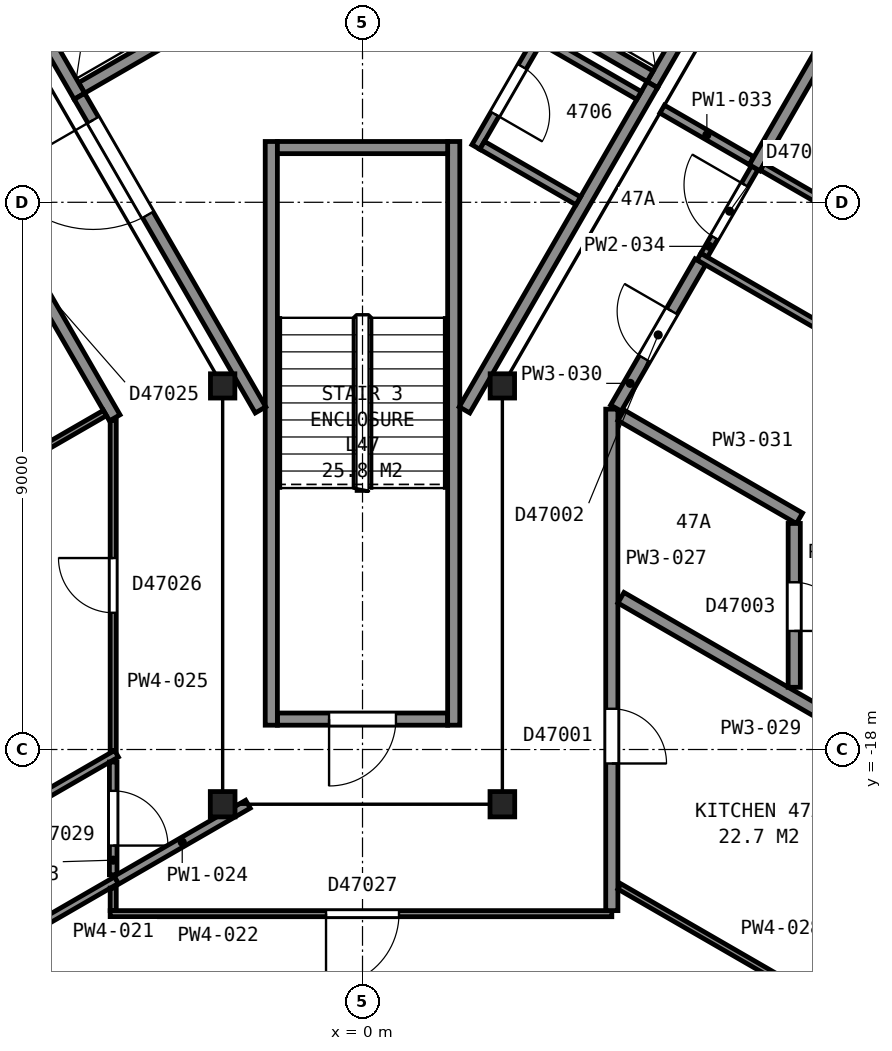
"""IFC4 building model, lengths in metres.
Left out: names, types, materials, properties, quantities, classifications, styles, units other than length and angle.
Written with IfcOpenShell. Run it as: python <this file> out.ifc"""

import sys

from ifc_helpers import new_model, si_unit, direction, frame, frame_2d, origin, origin_2d, place, context, subcontext, project, spatial, rectangle, i_section, extrude, element, fill, save


model = new_model("IFC4")
c1 = context("Model", 3, precision=1e-05, world=origin(), true_north=direction((0.0, 1.0)))
c2 = subcontext(c1, "Body", "Model", "MODEL_VIEW")
j1 = project(units=[si_unit("LENGTHUNIT", "METRE"), si_unit("PLANEANGLEUNIT", "RADIAN")], contexts=[c1])
p1 = place(None, origin())
s1 = spatial("IfcSite", under=j1, at=p1, CompositionType="ELEMENT")
p2 = place(p1, origin())
s2 = spatial("IfcBuilding", under=s1, at=p2, CompositionType="ELEMENT")
p3 = place(p2, frame((0.0, 0.0, 189.5)))
s3 = spatial("IfcBuildingStorey", under=s2, at=p3, CompositionType="ELEMENT", Elevation=189.5)
p4 = place(p3, frame((-2.3, -12.02, 0.0), z_axis=(0.0, 0.0, 1.0), x_axis=(1.0, 0.0, 0.0)))
e1 = element("IfcColumn", 1, at=p4, inside=s3, PredefinedType="COLUMN", context=c2, shape_type="SweptSolid", body=[
    extrude(i_section(OverallWidth=0.401, OverallDepth=0.399, WebThickness=0.025, FlangeThickness=0.04, FilletRadius=0.015, at=origin_2d()), origin(), (0.0, 0.0, 1.0), 3.7),
])
for number, where, z_axis, x_axis in (
    (2, (-2.3, -18.9, 0.0), (0.0, 0.0, 1.0), (-1.0, 0.0, 0.0)),
    (3, (2.3, -18.9, 0.0), (0.0, 0.0, 1.0), (-1.0, 0.0, 0.0)),
):
    element("IfcColumn", number, at=place(p3, frame(where, z_axis=z_axis, x_axis=x_axis)), inside=s3, PredefinedType="COLUMN", context=c2, shape_type="SweptSolid", body=[
        extrude(i_section(OverallWidth=0.406, OverallDepth=0.417, WebThickness=0.03, FlangeThickness=0.048, FilletRadius=0.015, at=origin_2d()), origin(), (0.0, 0.0, 1.0), 3.7),
    ])
p5 = place(p3, frame((2.3, -12.02, 0.0), z_axis=(0.0, 0.0, 1.0), x_axis=(1.0, 0.0, 0.0)))
e4 = element("IfcColumn", 4, at=p5, inside=s3, PredefinedType="COLUMN", context=c2, shape_type="SweptSolid", body=[
    extrude(i_section(OverallWidth=0.401, OverallDepth=0.399, WebThickness=0.025, FlangeThickness=0.04, FilletRadius=0.015, at=origin_2d()), origin(), (0.0, 0.0, 1.0), 3.7),
])
p6 = place(p3, frame((-1.4, -17.5, 0.0), z_axis=(0.0, 0.0, 1.0), x_axis=(1.0, 0.0, 0.0)))
e5 = element("IfcWall", 5, at=p6, inside=s3, PredefinedType="PARTITIONING", context=c2, shape_type="SweptSolid", body=[
    extrude(rectangle(XDim=2.8, YDim=0.2, at=frame_2d((1.4, 0.0))), origin(), (0.0, 0.0, 1.0), 3.45),
])
p7 = place(p6, frame((0.85, 0.0, 0.0)))
e6 = element("IfcOpeningElement", 6, at=p7, cuts=e5, PredefinedType="OPENING", context=c2, shape_type="SweptSolid", body=[
    extrude(rectangle(XDim=1.1, YDim=2.1, at=frame_2d((0.55, 1.05))), frame((0.0, 0.11, 0.0), z_axis=(0.0, -1.0, 0.0), x_axis=(1.0, 0.0, 0.0)), (0.0, 0.0, 1.0), 0.22),
])
for number, where, z_axis, x_axis in (
    (7, (1.5, -8.0, 0.0), (0.0, 0.0, 1.0), (0.0, -1.0, 0.0)),
    (8, (-1.5, -8.0, 0.0), (0.0, 0.0, 1.0), (0.0, -1.0, 0.0)),
):
    element("IfcWall", number, at=place(p3, frame(where, z_axis=z_axis, x_axis=x_axis)), inside=s3, PredefinedType="PARTITIONING", context=c2, shape_type="SweptSolid", body=[
        extrude(rectangle(XDim=9.6, YDim=0.2, at=frame_2d((4.8, 0.0))), origin(), (0.0, 0.0, 1.0), 3.45),
    ])
p8 = place(p3, frame((-1.4, -8.1, 0.0), z_axis=(0.0, 0.0, 1.0), x_axis=(1.0, 0.0, 0.0)))
e9 = element("IfcWall", 9, at=p8, inside=s3, PredefinedType="PARTITIONING", context=c2, shape_type="SweptSolid", body=[
    extrude(rectangle(XDim=2.8, YDim=0.2, at=frame_2d((1.4, 0.0))), origin(), (0.0, 0.0, 1.0), 3.45),
])
p9 = place(p3, frame((-4.62, -7.118, 0.0), z_axis=(0.0, 0.0, 1.0), x_axis=(0.866036909293, 0.499980071345, 0.0)))
e10 = element("IfcWall", 10, at=p9, inside=s3, PredefinedType="PARTITIONING", context=c2, shape_type="SweptSolid", body=[
    extrude(rectangle(XDim=1.75, YDim=0.2, at=frame_2d((0.875, 0.0))), origin(), (0.0, 0.0, 1.0), 3.7),
])
p10 = place(p3, frame((4.766, -7.065, 0.0), z_axis=(0.0, 0.0, 1.0), x_axis=(0.499948979701, 0.866054858364, 0.0)))
e11 = element("IfcWall", 11, at=p10, inside=s3, PredefinedType="PARTITIONING", context=c2, shape_type="SweptSolid", body=[
    extrude(rectangle(XDim=2.55, YDim=0.2, at=frame_2d((1.275, 0.0))), origin(), (0.0, 0.0, 1.0), 3.7),
])
p11 = place(p3, frame((-4.656, -7.255, 0.0), z_axis=(0.0, 0.0, 1.0), x_axis=(-0.499990435942, 0.866030925526, 0.0)))
e12 = element("IfcWall", 12, at=p11, inside=s3, PredefinedType="PARTITIONING", context=c2, shape_type="SweptSolid", body=[
    extrude(rectangle(XDim=2.55, YDim=0.2, at=frame_2d((1.275, 0.0))), origin(), (0.0, 0.0, 1.0), 3.7),
])
p12 = place(p3, frame((4.73, -6.928, 0.0), z_axis=(0.0, 0.0, 1.0), x_axis=(-0.866036909293, 0.499980071345, 0.0)))
e13 = element("IfcWall", 13, at=p12, inside=s3, PredefinedType="PARTITIONING", context=c2, shape_type="SweptSolid", body=[
    extrude(rectangle(XDim=1.75, YDim=0.2, at=frame_2d((0.875, 0.0))), origin(), (0.0, 0.0, 1.0), 3.7),
])
p13 = place(p3, frame((-4.655, -7.257, 0.0), z_axis=(0.0, 0.0, 1.0), x_axis=(0.499966124405, -0.866044960985, 0.0)))
e14 = element("IfcWall", 14, at=p13, inside=s3, PredefinedType="PARTITIONING", context=c2, shape_type="SweptSolid", body=[
    extrude(rectangle(XDim=5.956, YDim=0.2, at=frame_2d((2.978, 0.0))), origin(), (0.0, 0.0, 1.0), 3.45),
])
p14 = place(p13, frame((0.45, 0.0, 0.0)))
e15 = element("IfcOpeningElement", 15, at=p14, cuts=e14, PredefinedType="OPENING", context=c2, shape_type="SweptSolid", body=[
    extrude(rectangle(XDim=1.8, YDim=2.1, at=frame_2d((0.9, 1.05))), frame((0.0, 0.11, 0.0), z_axis=(0.0, -1.0, 0.0), x_axis=(1.0, 0.0, 0.0)), (0.0, 0.0, 1.0), 0.22),
])
p15 = place(p3, frame((1.677, -12.415, 0.0), z_axis=(0.0, 0.0, 1.0), x_axis=(0.500054337157, 0.865994029939, 0.0)))
e16 = element("IfcWall", 16, at=p15, inside=s3, PredefinedType="PARTITIONING", context=c2, shape_type="SweptSolid", body=[
    extrude(rectangle(XDim=6.177, YDim=0.2, at=frame_2d((3.088, 0.0))), origin(), (0.0, 0.0, 1.0), 3.45),
])
p16 = place(p3, frame((2.939, -6.229, 0.0), z_axis=(0.0, 0.0, 1.0), x_axis=(-0.499961633463, -0.866047553582, 0.0)))
e17 = element("IfcWall", 17, at=p16, inside=s3, PredefinedType="PARTITIONING", context=c2, shape_type="SweptSolid", body=[
    extrude(rectangle(XDim=2.15, YDim=0.15, at=frame_2d((1.075, 0.0))), origin(), (0.0, 0.0, 1.0), 3.45),
])
p17 = place(p16, frame((0.625, 0.0, 0.0)))
e18 = element("IfcOpeningElement", 18, at=p17, cuts=e17, PredefinedType="OPENING", context=c2, shape_type="SweptSolid", body=[
    extrude(rectangle(XDim=0.9, YDim=2.1, at=frame_2d((0.45, 1.05))), frame((0.0, 0.085, 0.0), z_axis=(0.0, -1.0, 0.0), x_axis=(1.0, 0.0, 0.0)), (0.0, 0.0, 1.0), 0.17),
])
p18 = place(p3, frame((1.967, -8.063, 0.0), z_axis=(0.0, 0.0, 1.0), x_axis=(0.865978377894, -0.500081442387, 0.0)))
e19 = element("IfcWall", 19, at=p18, inside=s3, PredefinedType="PARTITIONING", context=c2, shape_type="SweptSolid", body=[
    extrude(rectangle(XDim=1.825, YDim=0.15, at=frame_2d((0.913, 0.0))), origin(), (0.0, 0.0, 1.0), 3.45),
])
p19 = place(p3, frame((2.967, -6.332, 0.0), z_axis=(0.0, 0.0, 1.0), x_axis=(0.866036312054, -0.499981105847, 0.0)))
e20 = element("IfcWall", 20, at=p19, inside=s3, PredefinedType="PARTITIONING", context=c2, shape_type="SweptSolid", body=[
    extrude(rectangle(XDim=1.825, YDim=0.15, at=frame_2d((0.912, 0.0))), origin(), (0.0, 0.0, 1.0), 3.45),
])
p20 = place(p3, frame((-4.075, -12.545, 0.0), z_axis=(0.0, 0.0, 1.0), x_axis=(-0.499999743747, 0.866025551732, 0.0)))
e21 = element("IfcWall", 21, at=p20, inside=s3, PredefinedType="PARTITIONING", context=c2, shape_type="SweptSolid", body=[
    extrude(rectangle(XDim=17.656, YDim=0.2, at=frame_2d((8.828, 0.0))), origin(), (0.0, 0.0, 1.0), 2.713),
])
p21 = place(p20, frame((10.83, 0.0, 0.0)))
e22 = element("IfcOpeningElement", 22, at=p21, cuts=e21, PredefinedType="OPENING", context=c2, shape_type="SweptSolid", body=[
    extrude(rectangle(XDim=0.9, YDim=2.1, at=frame_2d((0.45, 1.05))), frame((0.0, 0.11, 0.0), z_axis=(0.0, -1.0, 0.0), x_axis=(1.0, 0.0, 0.0)), (0.0, 0.0, 1.0), 0.22),
])
p22 = place(p20, frame((7.148, 0.0, 0.0)))
e23 = element("IfcOpeningElement", 23, at=p22, cuts=e21, PredefinedType="OPENING", context=c2, shape_type="SweptSolid", body=[
    extrude(rectangle(XDim=0.9, YDim=2.1, at=frame_2d((0.45, 1.05))), frame((0.0, 0.11, 0.0), z_axis=(0.0, -1.0, 0.0), x_axis=(1.0, 0.0, 0.0)), (0.0, 0.0, 1.0), 0.22),
])
p23 = place(p20, frame((2.198, 0.0, 0.0)))
e24 = element("IfcOpeningElement", 24, at=p23, cuts=e21, PredefinedType="OPENING", context=c2, shape_type="SweptSolid", body=[
    extrude(rectangle(XDim=0.9, YDim=2.1, at=frame_2d((0.45, 1.05))), frame((0.0, 0.11, 0.0), z_axis=(0.0, -1.0, 0.0), x_axis=(1.0, 0.0, 0.0)), (0.0, 0.0, 1.0), 0.22),
])
p24 = place(p3, frame((-11.54, -16.682, 0.0), z_axis=(0.0, 0.0, 1.0), x_axis=(0.866063141794, 0.499934630153, 0.0)))
e25 = element("IfcWall", 25, at=p24, inside=s3, PredefinedType="PARTITIONING", context=c2, shape_type="SweptSolid", body=[
    extrude(rectangle(XDim=8.433, YDim=0.1, at=frame_2d((4.217, 0.0))), origin(), (0.0, 0.0, 1.0), 2.713),
])
p25 = place(p3, frame((-9.066, -20.968, 0.0), z_axis=(0.0, 0.0, 1.0), x_axis=(0.866023559602, 0.500003194204, 0.0)))
e26 = element("IfcWall", 26, at=p25, inside=s3, PredefinedType="PARTITIONING", context=c2, shape_type="SweptSolid", body=[
    extrude(rectangle(XDim=5.796, YDim=0.125, at=frame_2d((2.898, 0.0))), origin(), (0.0, 0.0, 1.0), 2.713),
])
p26 = place(p3, frame((-8.166, -22.527, 0.0), z_axis=(0.0, 0.0, 1.0), x_axis=(0.866042865666, 0.499969753915, 0.0)))
e27 = element("IfcWall", 27, at=p26, inside=s3, PredefinedType="PARTITIONING", context=c2, shape_type="SweptSolid", body=[
    extrude(rectangle(XDim=4.757, YDim=0.125, at=frame_2d((2.378, 0.0))), origin(), (0.0, 0.0, 1.0), 2.713),
])
p27 = place(p3, frame((-4.1, -20.65, 0.0), z_axis=(0.0, 0.0, 1.0), x_axis=(0.0, 1.0, 0.0)))
e28 = element("IfcWall", 28, at=p27, inside=s3, PredefinedType="PARTITIONING", context=c2, shape_type="SweptSolid", body=[
    extrude(rectangle(XDim=0.37, YDim=0.1, at=frame_2d((0.185, 0.0))), origin(), (0.0, 0.0, 1.0), 2.713),
])
p28 = place(p3, frame((4.1, -20.7, 0.0), z_axis=(0.0, 0.0, 1.0), x_axis=(-1.0, 0.0, 0.0)))
e29 = element("IfcWall", 29, at=p28, inside=s3, PredefinedType="PARTITIONING", context=c2, shape_type="SweptSolid", body=[
    extrude(rectangle(XDim=8.25, YDim=0.1, at=frame_2d((4.125, 0.0))), origin(), (0.0, 0.0, 1.0), 2.713),
])
p29 = place(p28, frame((3.5, 0.0, 0.0)))
e30 = element("IfcOpeningElement", 30, at=p29, cuts=e29, PredefinedType="OPENING", context=c2, shape_type="SweptSolid", body=[
    extrude(rectangle(XDim=1.2, YDim=2.1, at=frame_2d((0.6, 1.05))), frame((0.0, 0.06, 0.0), z_axis=(0.0, -1.0, 0.0), x_axis=(1.0, 0.0, 0.0)), (0.0, 0.0, 1.0), 0.12),
])
p30 = place(p3, frame((-4.1, -18.206, 0.0), z_axis=(0.0, 0.0, 1.0), x_axis=(0.0, -1.0, 0.0)))
e31 = element("IfcWall", 31, at=p30, inside=s3, PredefinedType="PARTITIONING", context=c2, shape_type="SweptSolid", body=[
    extrude(rectangle(XDim=1.854, YDim=0.125, at=frame_2d((0.927, 0.0))), origin(), (0.0, 0.0, 1.0), 2.713),
])
p31 = place(p30, frame((0.474, 0.0, 0.0)))
e32 = element("IfcOpeningElement", 32, at=p31, cuts=e31, PredefinedType="OPENING", context=c2, shape_type="SweptSolid", body=[
    extrude(rectangle(XDim=0.9, YDim=2.1, at=frame_2d((0.45, 1.05))), frame((0.0, 0.073, 0.0), z_axis=(0.0, -1.0, 0.0), x_axis=(1.0, 0.0, 0.0)), (0.0, 0.0, 1.0), 0.145),
])
p32 = place(p3, frame((-4.046, -20.149, 0.0), z_axis=(0.0, 0.0, 1.0), x_axis=(0.865916841101, 0.500187988959, 0.0)))
e33 = element("IfcWall", 33, at=p32, inside=s3, PredefinedType="PARTITIONING", context=c2, shape_type="SweptSolid", body=[
    extrude(rectangle(XDim=2.497, YDim=0.15, at=frame_2d((1.248, 0.0))), origin(), (0.0, 0.0, 1.0), 2.713),
])
p33 = place(p3, frame((-4.1, -18.016, 0.0), z_axis=(0.0, 0.0, 1.0), x_axis=(0.0, 1.0, 0.0)))
e34 = element("IfcWall", 34, at=p33, inside=s3, PredefinedType="PARTITIONING", context=c2, shape_type="SweptSolid", body=[
    extrude(rectangle(XDim=5.429, YDim=0.1, at=frame_2d((2.715, 0.0))), origin(), (0.0, 0.0, 1.0), 2.713),
])
p34 = place(p33, frame((2.265, 0.0, 0.0)))
e35 = element("IfcOpeningElement", 35, at=p34, cuts=e34, PredefinedType="OPENING", context=c2, shape_type="SweptSolid", body=[
    extrude(rectangle(XDim=0.9, YDim=2.1, at=frame_2d((0.45, 1.05))), frame((0.0, 0.06, 0.0), z_axis=(0.0, -1.0, 0.0), x_axis=(1.0, 0.0, 0.0)), (0.0, 0.0, 1.0), 0.12),
])
p35 = place(p3, frame((4.1, -12.402, 0.0), z_axis=(0.0, 0.0, 1.0), x_axis=(0.0, -1.0, 0.0)))
e36 = element("IfcWall", 36, at=p35, inside=s3, PredefinedType="PARTITIONING", context=c2, shape_type="SweptSolid", body=[
    extrude(rectangle(XDim=8.248, YDim=0.2, at=frame_2d((4.124, 0.0))), origin(), (0.0, 0.0, 1.0), 2.713),
])
p36 = place(p35, frame((4.928, 0.0, 0.0)))
e37 = element("IfcOpeningElement", 37, at=p36, cuts=e36, PredefinedType="OPENING", context=c2, shape_type="SweptSolid", body=[
    extrude(rectangle(XDim=0.9, YDim=2.1, at=frame_2d((0.45, 1.05))), frame((0.0, 0.11, 0.0), z_axis=(0.0, -1.0, 0.0), x_axis=(1.0, 0.0, 0.0)), (0.0, 0.0, 1.0), 0.22),
])
p37 = place(p3, frame((4.225, -20.252, 0.0), z_axis=(0.0, 0.0, 1.0), x_axis=(0.866048884701, -0.499959327653, 0.0)))
e38 = element("IfcWall", 38, at=p37, inside=s3, PredefinedType="PARTITIONING", context=c2, shape_type="SweptSolid", body=[
    extrude(rectangle(XDim=4.55, YDim=0.1, at=frame_2d((2.275, 0.0))), origin(), (0.0, 0.0, 1.0), 2.713),
])
p38 = place(p3, frame((4.25, -15.504, 0.0), z_axis=(0.0, 0.0, 1.0), x_axis=(0.866025383743, -0.500000034713, 0.0)))
e39 = element("IfcWall", 39, at=p38, inside=s3, PredefinedType="PARTITIONING", context=c2, shape_type="SweptSolid", body=[
    extrude(rectangle(XDim=6.903, YDim=0.2, at=frame_2d((3.451, 0.0))), origin(), (0.0, 0.0, 1.0), 2.713),
])
p39 = place(p3, frame((5.556, -9.98, 0.0), z_axis=(0.0, 0.0, 1.0), x_axis=(-0.499940639567, -0.866059672834, 0.0)))
e40 = element("IfcWall", 40, at=p39, inside=s3, PredefinedType="PARTITIONING", context=c2, shape_type="SweptSolid", body=[
    extrude(rectangle(XDim=2.777, YDim=0.2, at=frame_2d((1.388, 0.0))), origin(), (0.0, 0.0, 1.0), 2.713),
])
p40 = place(p39, frame((0.937, 0.0, 0.0)))
e41 = element("IfcOpeningElement", 41, at=p40, cuts=e40, PredefinedType="OPENING", context=c2, shape_type="SweptSolid", body=[
    extrude(rectangle(XDim=0.9, YDim=2.1, at=frame_2d((0.45, 1.05))), frame((0.0, 0.11, 0.0), z_axis=(0.0, -1.0, 0.0), x_axis=(1.0, 0.0, 0.0)), (0.0, 0.0, 1.0), 0.22),
])
p41 = place(p3, frame((4.25, -12.502, 0.0), z_axis=(0.0, 0.0, 1.0), x_axis=(0.866032087317, -0.499988423603, 0.0)))
e42 = element("IfcWall", 42, at=p41, inside=s3, PredefinedType="PARTITIONING", context=c2, shape_type="SweptSolid", body=[
    extrude(rectangle(XDim=3.39, YDim=0.2, at=frame_2d((1.695, 0.0))), origin(), (0.0, 0.0, 1.0), 2.713),
])
p42 = place(p3, frame((4.928, -7.468, 0.0), z_axis=(0.0, 0.0, 1.0), x_axis=(0.866075426483, -0.499913348133, 0.0)))
e43 = element("IfcWall", 43, at=p42, inside=s3, PredefinedType="PARTITIONING", context=c2, shape_type="SweptSolid", body=[
    extrude(rectangle(XDim=1.698, YDim=0.15, at=frame_2d((0.849, 0.0))), origin(), (0.0, 0.0, 1.0), 2.713),
])
p43 = place(p3, frame((5.62, -9.87, 0.0), z_axis=(0.0, 0.0, 1.0), x_axis=(0.500142759665, 0.865942965763, 0.0)))
e44 = element("IfcWall", 44, at=p43, inside=s3, PredefinedType="PARTITIONING", context=c2, shape_type="SweptSolid", body=[
    extrude(rectangle(XDim=1.659, YDim=0.125, at=frame_2d((0.83, 0.0))), origin(), (0.0, 0.0, 1.0), 2.713),
])
p44 = place(p43, frame((0.335, 0.0, 0.0)))
e45 = element("IfcOpeningElement", 45, at=p44, cuts=e44, PredefinedType="OPENING", context=c2, shape_type="SweptSolid", body=[
    extrude(rectangle(XDim=1.0, YDim=2.1, at=frame_2d((0.5, 1.05))), frame((0.0, 0.073, 0.0), z_axis=(0.0, -1.0, 0.0), x_axis=(1.0, 0.0, 0.0)), (0.0, 0.0, 1.0), 0.145),
])
p45 = place(p3, frame((5.533, -9.895, 0.0), z_axis=(0.0, 0.0, 1.0), x_axis=(0.865995449608, -0.500051878567, 0.0)))
e46 = element("IfcWall", 46, at=p45, inside=s3, PredefinedType="PARTITIONING", context=c2, shape_type="SweptSolid", body=[
    extrude(rectangle(XDim=8.596, YDim=0.125, at=frame_2d((4.298, 0.0))), origin(), (0.0, 0.0, 1.0), 2.713),
])
p46 = place(p3, frame((12.903, 2.745, 0.0), z_axis=(0.0, 0.0, 1.0), x_axis=(-0.499992063946, -0.866029985619, 0.0)))
e47 = element("IfcWall", 47, at=p46, inside=s3, PredefinedType="PARTITIONING", context=c2, shape_type="SweptSolid", body=[
    extrude(rectangle(XDim=12.907, YDim=0.2, at=frame_2d((6.454, 0.0))), origin(), (0.0, 0.0, 1.0), 2.713),
])
p47 = place(p46, frame((9.032, 0.0, 0.0)))
e48 = element("IfcOpeningElement", 48, at=p47, cuts=e47, PredefinedType="OPENING", context=c2, shape_type="SweptSolid", body=[
    extrude(rectangle(XDim=0.9, YDim=2.1, at=frame_2d((0.45, 1.05))), frame((0.0, 0.11, 0.0), z_axis=(0.0, -1.0, 0.0), x_axis=(1.0, 0.0, 0.0)), (0.0, 0.0, 1.0), 0.22),
])
p48 = place(p46, frame((5.349, 0.0, 0.0)))
e49 = element("IfcOpeningElement", 49, at=p48, cuts=e47, PredefinedType="OPENING", context=c2, shape_type="SweptSolid", body=[
    extrude(rectangle(XDim=0.9, YDim=2.1, at=frame_2d((0.45, 1.05))), frame((0.0, 0.11, 0.0), z_axis=(0.0, -1.0, 0.0), x_axis=(1.0, 0.0, 0.0)), (0.0, 0.0, 1.0), 0.22),
])
p49 = place(p3, frame((6.576, -8.419, 0.0), z_axis=(0.0, 0.0, 1.0), x_axis=(0.866048155274, -0.499960591193, 0.0)))
e50 = element("IfcWall", 50, at=p49, inside=s3, PredefinedType="PARTITIONING", context=c2, shape_type="SweptSolid", body=[
    extrude(rectangle(XDim=8.431, YDim=0.125, at=frame_2d((4.215, 0.0))), origin(), (0.0, 0.0, 1.0), 2.713),
])
p50 = place(p3, frame((7.1, -16.977, 0.0), z_axis=(0.0, 0.0, 1.0), x_axis=(0.0, 1.0, 0.0)))
e51 = element("IfcWall", 51, at=p50, inside=s3, PredefinedType="PARTITIONING", context=c2, shape_type="SweptSolid", body=[
    extrude(rectangle(XDim=2.695, YDim=0.2, at=frame_2d((1.347, 0.0))), origin(), (0.0, 0.0, 1.0), 2.713),
])
p51 = place(p50, frame((0.927, 0.0, 0.0)))
e52 = element("IfcOpeningElement", 52, at=p51, cuts=e51, PredefinedType="OPENING", context=c2, shape_type="SweptSolid", body=[
    extrude(rectangle(XDim=0.8, YDim=2.1, at=frame_2d((0.4, 1.05))), frame((0.0, 0.11, 0.0), z_axis=(0.0, -1.0, 0.0), x_axis=(1.0, 0.0, 0.0)), (0.0, 0.0, 1.0), 0.22),
])
p52 = place(p7, origin())
e53 = element("IfcDoor", 53, at=p52, inside=s3, OperationType="SINGLE_SWING_LEFT", PredefinedType="DOOR", context=c2, shape_type="SweptSolid", body=[
    extrude(rectangle(XDim=1.1, YDim=2.1, at=frame_2d((0.55, 1.05))), frame((0.0, 0.025, 0.0), z_axis=(0.0, -1.0, 0.0), x_axis=(1.0, 0.0, 0.0)), (0.0, 0.0, 1.0), 0.05),
])
fill(e6, e53)
p53 = place(p14, origin())
e54 = element("IfcDoor", 54, at=p53, inside=s3, OperationType="DOUBLE_DOOR_SINGLE_SWING", PredefinedType="DOOR", context=c2, shape_type="SweptSolid", body=[
    extrude(rectangle(XDim=1.8, YDim=2.1, at=frame_2d((0.9, 1.05))), frame((0.0, 0.025, 0.0), z_axis=(0.0, -1.0, 0.0), x_axis=(1.0, 0.0, 0.0)), (0.0, 0.0, 1.0), 0.05),
])
fill(e15, e54)
p54 = place(p17, origin())
e55 = element("IfcDoor", 55, at=p54, inside=s3, OperationType="SINGLE_SWING_RIGHT", PredefinedType="DOOR", context=c2, shape_type="SweptSolid", body=[
    extrude(rectangle(XDim=0.9, YDim=2.1, at=frame_2d((0.45, 1.05))), frame((0.0, 0.025, 0.0), z_axis=(0.0, -1.0, 0.0), x_axis=(1.0, 0.0, 0.0)), (0.0, 0.0, 1.0), 0.05),
])
fill(e18, e55)
p55 = place(p29, origin())
e56 = element("IfcDoor", 56, at=p55, inside=s3, OperationType="SINGLE_SWING_RIGHT", PredefinedType="DOOR", context=c2, shape_type="SweptSolid", body=[
    extrude(rectangle(XDim=1.2, YDim=2.1, at=frame_2d((0.6, 1.05))), frame((0.0, 0.025, 0.0), z_axis=(0.0, -1.0, 0.0), x_axis=(1.0, 0.0, 0.0)), (0.0, 0.0, 1.0), 0.05),
])
fill(e30, e56)
p56 = place(p31, origin())
e57 = element("IfcDoor", 57, at=p56, inside=s3, OperationType="SINGLE_SWING_RIGHT", PredefinedType="DOOR", context=c2, shape_type="SweptSolid", body=[
    extrude(rectangle(XDim=0.9, YDim=2.1, at=frame_2d((0.45, 1.05))), frame((0.0, 0.025, 0.0), z_axis=(0.0, -1.0, 0.0), x_axis=(1.0, 0.0, 0.0)), (0.0, 0.0, 1.0), 0.05),
])
fill(e32, e57)
p57 = place(p34, origin())
e58 = element("IfcDoor", 58, at=p57, inside=s3, OperationType="SINGLE_SWING_RIGHT", PredefinedType="DOOR", context=c2, shape_type="SweptSolid", body=[
    extrude(rectangle(XDim=0.9, YDim=2.1, at=frame_2d((0.45, 1.05))), frame((0.0, 0.025, 0.0), z_axis=(0.0, -1.0, 0.0), x_axis=(1.0, 0.0, 0.0)), (0.0, 0.0, 1.0), 0.05),
])
fill(e35, e58)
p58 = place(p36, origin())
e59 = element("IfcDoor", 59, at=p58, inside=s3, OperationType="SINGLE_SWING_RIGHT", PredefinedType="DOOR", context=c2, shape_type="SweptSolid", body=[
    extrude(rectangle(XDim=0.9, YDim=2.1, at=frame_2d((0.45, 1.05))), frame((0.0, 0.025, 0.0), z_axis=(0.0, -1.0, 0.0), x_axis=(1.0, 0.0, 0.0)), (0.0, 0.0, 1.0), 0.05),
])
fill(e37, e59)
p59 = place(p40, origin())
e60 = element("IfcDoor", 60, at=p59, inside=s3, OperationType="SINGLE_SWING_LEFT", PredefinedType="DOOR", context=c2, shape_type="SweptSolid", body=[
    extrude(rectangle(XDim=0.9, YDim=2.1, at=frame_2d((0.45, 1.05))), frame((0.0, 0.025, 0.0), z_axis=(0.0, -1.0, 0.0), x_axis=(1.0, 0.0, 0.0)), (0.0, 0.0, 1.0), 0.05),
])
fill(e41, e60)
p60 = place(p44, origin())
e61 = element("IfcDoor", 61, at=p60, inside=s3, OperationType="SINGLE_SWING_RIGHT", PredefinedType="DOOR", context=c2, shape_type="SweptSolid", body=[
    extrude(rectangle(XDim=1.0, YDim=2.1, at=frame_2d((0.5, 1.05))), frame((0.0, 0.025, 0.0), z_axis=(0.0, -1.0, 0.0), x_axis=(1.0, 0.0, 0.0)), (0.0, 0.0, 1.0), 0.05),
])
fill(e45, e61)
p61 = place(p51, origin())
e62 = element("IfcDoor", 62, at=p61, inside=s3, OperationType="SINGLE_SWING_LEFT", PredefinedType="DOOR", context=c2, shape_type="SweptSolid", body=[
    extrude(rectangle(XDim=0.8, YDim=2.1, at=frame_2d((0.4, 1.05))), frame((0.0, 0.025, 0.0), z_axis=(0.0, -1.0, 0.0), x_axis=(1.0, 0.0, 0.0)), (0.0, 0.0, 1.0), 0.05),
])
fill(e52, e62)
save(model, sys.argv[1])
